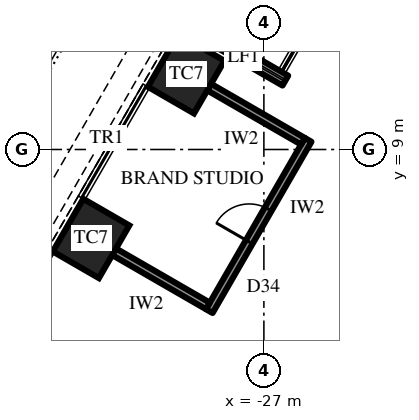
"""IFC4 building model, lengths in metres.
Left out: names, types, materials, properties, quantities, classifications, styles, units other than length and angle.
Written with IfcOpenShell. Run it as: python <this file> out.ifc"""

import sys

from ifc_helpers import new_model, si_unit, direction, frame, frame_2d, origin, origin_2d, place, context, subcontext, project, spatial, rectangle, extrude, element, fill, save


model = new_model("IFC4")
c1 = context("Model", 3, precision=1e-05, world=origin(), true_north=direction((0.0, 1.0)))
c2 = subcontext(c1, "Body", "Model", "MODEL_VIEW")
j1 = project(units=[si_unit("LENGTHUNIT", "METRE"), si_unit("PLANEANGLEUNIT", "RADIAN")], contexts=[c1])
p1 = place(None, origin())
s1 = spatial("IfcSite", under=j1, at=p1, CompositionType="ELEMENT")
p2 = place(p1, origin())
s2 = spatial("IfcBuilding", under=s1, at=p2, CompositionType="ELEMENT")
p3 = place(p2, frame((0.0, 0.0, 178.3)))
s3 = spatial("IfcBuildingStorey", under=s2, at=p3, CompositionType="ELEMENT", Elevation=178.3)
for number, where, z_axis, x_axis in (
    (1, (-29.045, 10.992, 0.0), (0.0, 0.0, 1.0), (-0.5, -0.866, 0.0)),
    (2, (-31.547, 6.658, 0.0), (0.0, 0.0, 1.0), (-0.5, -0.866, 0.0)),
):
    element("IfcColumn", number, at=place(p3, frame(where, z_axis=z_axis, x_axis=x_axis)), inside=s3, PredefinedType="COLUMN", context=c2, shape_type="SweptSolid", body=[
        extrude(rectangle(XDim=1.6, YDim=1.4, at=origin_2d()), origin(), (0.0, 0.0, 1.0), 4.2),
    ])
p4 = place(p3, frame((-29.12, 12.363, 0.0), z_axis=(0.0, 0.0, 1.0), x_axis=(0.86602952684, -0.49999285859, 0.0)))
e3 = element("IfcWall", 3, at=p4, inside=s3, PredefinedType="SOLIDWALL", context=c2, shape_type="SweptSolid", body=[
    extrude(rectangle(XDim=3.1, YDim=0.3, at=frame_2d((1.55, 0.0))), origin(), (0.0, 0.0, 1.0), 2.75),
])
p5 = place(p3, frame((-25.834, 9.253, 0.0), z_axis=(0.0, 0.0, 1.0), x_axis=(-0.500009456303, -0.866019944116, 0.0)))
e4 = element("IfcWall", 4, at=p5, inside=s3, PredefinedType="PARTITIONING", context=c2, shape_type="SweptSolid", body=[
    extrude(rectangle(XDim=5.204, YDim=0.2, at=frame_2d((2.602, 0.0))), origin(), (0.0, 0.0, 1.0), 4.0),
])
p6 = place(p5, frame((2.102, 0.0, 0.0)))
e5 = element("IfcOpeningElement", 5, at=p6, cuts=e4, PredefinedType="OPENING", context=c2, shape_type="SweptSolid", body=[
    extrude(rectangle(XDim=1.0, YDim=2.2, at=frame_2d((0.5, 1.1))), frame((0.0, 0.11, 0.0), z_axis=(0.0, -1.0, 0.0), x_axis=(1.0, 0.0, 0.0)), (0.0, 0.0, 1.0), 0.22),
])
p7 = place(p3, frame((-25.971, 9.217, 0.0), z_axis=(0.0, 0.0, 1.0), x_axis=(-0.866004402611, 0.500036373335, 0.0)))
e6 = element("IfcWall", 6, at=p7, inside=s3, PredefinedType="PARTITIONING", context=c2, shape_type="SweptSolid", body=[
    extrude(rectangle(XDim=2.85, YDim=0.2, at=frame_2d((1.425, 0.0))), origin(), (0.0, 0.0, 1.0), 3.082),
])
p8 = place(p3, frame((-28.473, 4.883, 0.0), z_axis=(0.0, 0.0, 1.0), x_axis=(-0.866025820012, 0.499999279071, 0.0)))
e7 = element("IfcWall", 7, at=p8, inside=s3, PredefinedType="PARTITIONING", context=c2, shape_type="SweptSolid", body=[
    extrude(rectangle(XDim=2.85, YDim=0.2, at=frame_2d((1.425, 0.0))), origin(), (0.0, 0.0, 1.0), 3.082),
])
p9 = place(p6, frame((1.0, 0.0, 0.0), z_axis=(0.0, 0.0, 1.0), x_axis=(-1.0, 0.0, 0.0)))
e8 = element("IfcDoor", 8, at=p9, inside=s3, OperationType="SINGLE_SWING_RIGHT", PredefinedType="DOOR", context=c2, shape_type="SweptSolid", body=[
    extrude(rectangle(XDim=1.0, YDim=2.2, at=frame_2d((0.5, 1.1))), frame((0.0, 0.025, 0.0), z_axis=(0.0, -1.0, 0.0), x_axis=(1.0, 0.0, 0.0)), (0.0, 0.0, 1.0), 0.05),
])
fill(e5, e8)
save(model, sys.argv[1])
